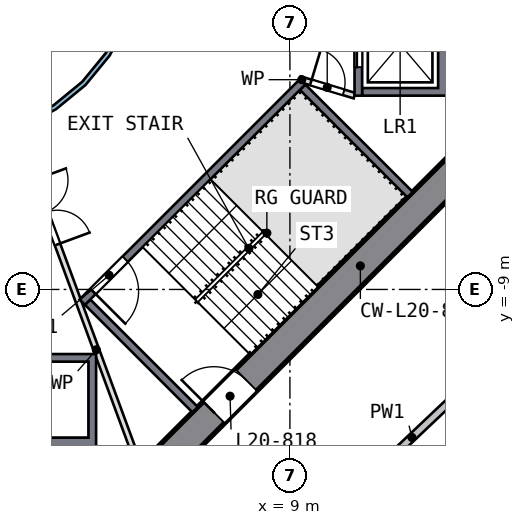
"""IFC4 building model, lengths in metres.
Left out: names, types, materials, properties, quantities, classifications, styles, units other than length and angle.
Written with IfcOpenShell. Run it as: python <this file> out.ifc"""

import sys

from ifc_helpers import new_model, si_unit, direction, frame, frame_2d, origin, place, context, subcontext, project, spatial, polyline, rectangle, outline, extrude, element, fill, save


model = new_model("IFC4")
c1 = context("Model", 3, precision=1e-05, world=origin(), true_north=direction((0.0, 1.0)))
c2 = subcontext(c1, "Body", "Model", "MODEL_VIEW")
j1 = project(units=[si_unit("LENGTHUNIT", "METRE"), si_unit("PLANEANGLEUNIT", "RADIAN")], contexts=[c1])
p1 = place(None, origin())
s1 = spatial("IfcSite", under=j1, at=p1, CompositionType="ELEMENT")
p2 = place(p1, origin())
s2 = spatial("IfcBuilding", under=s1, at=p2, CompositionType="ELEMENT")
p3 = place(p2, frame((0.0, 0.0, 89.5)))
s3 = spatial("IfcBuildingStorey", under=s2, at=p3, CompositionType="ELEMENT", Elevation=89.5)
p4 = place(p3, frame((5.516, -13.717, 0.0), z_axis=(0.0, 0.0, 1.0), x_axis=(0.707106781, 0.707106781, 0.0)))
e1 = element("IfcWall", 1, at=p4, inside=s3, PredefinedType="SHEAR", context=c2, shape_type="SweptSolid", body=[
    extrude(rectangle(XDim=11.598, YDim=0.8, at=frame_2d((5.799, 0.0))), origin(), (0.0, 0.0, 1.0), 3.5),
])
p5 = place(p4, frame((2.099, 0.0, 0.0)))
e2 = element("IfcOpeningElement", 2, at=p5, cuts=e1, PredefinedType="OPENING", context=c2, shape_type="SweptSolid", body=[
    extrude(rectangle(XDim=1.2, YDim=2.1, at=frame_2d((0.6, 1.05))), frame((0.0, 0.41, 0.0), z_axis=(0.0, -1.0, 0.0), x_axis=(1.0, 0.0, 0.0)), (0.0, 0.0, 1.0), 0.82),
])
p6 = place(p3, origin())
e3 = element("IfcWall", 3, at=p6, inside=s3, PredefinedType="SOLIDWALL", context=c2, shape_type="SweptSolid", body=[
    extrude(outline(polyline([(13.2, -3.9), (10.9, -3.9), (10.9, -3.7), (12.9, -3.7), (12.9, -1.4), (10.9, -1.4), (10.9, -1.2), (13.2, -1.2), (13.2, -3.9)])), origin(), (0.0, 0.0, 1.0), 3.19),
])
p7 = place(p3, frame((10.8, -1.2, 0.0), z_axis=(0.0, 0.0, 1.0), x_axis=(0.0, -1.0, 0.0)))
e4 = element("IfcWall", 4, at=p7, inside=s3, PredefinedType="SOLIDWALL", context=c2, shape_type="SweptSolid", body=[
    extrude(rectangle(XDim=2.7, YDim=0.2, at=frame_2d((1.35, 0.0))), origin(), (0.0, 0.0, 1.0), 3.19),
])
p8 = place(p7, frame((0.75, 0.0, 0.0)))
e5 = element("IfcOpeningElement", 5, at=p8, cuts=e4, PredefinedType="OPENING", context=c2, shape_type="SweptSolid", body=[
    extrude(rectangle(XDim=1.2, YDim=2.1, at=frame_2d((0.6, 1.05))), frame((0.0, 0.11, 0.0), z_axis=(0.0, -1.0, 0.0), x_axis=(1.0, 0.0, 0.0)), (0.0, 0.0, 1.0), 0.22),
])
p9 = place(p3, origin())
e6 = element("IfcWall", 6, at=p9, inside=s3, PredefinedType="SOLIDWALL", context=c2, shape_type="SweptSolid", body=[
    extrude(outline(polyline([(3.9, -10.7), (3.9, -13.2), (1.2, -13.2), (1.2, -10.7), (3.9, -10.7)]), holes=[polyline([(1.4, -12.9), (3.7, -12.9), (3.7, -10.9), (1.4, -10.9), (1.4, -12.9)])]), origin(), (0.0, 0.0, 1.0), 3.19),
])
p10 = place(p3, frame((9.334, -3.535, 0.0), z_axis=(0.0, 0.0, 1.0), x_axis=(-0.707106781, -0.707106781, 0.0)))
e7 = element("IfcWall", 7, at=p10, inside=s3, PredefinedType="SOLIDWALL", context=c2, shape_type="SweptSolid", body=[
    extrude(rectangle(XDim=8.2, YDim=0.2, at=frame_2d((4.1, 0.0))), origin(), (0.0, 0.0, 1.0), 3.19),
])
p11 = place(p10, frame((6.6, 0.0, 0.0)))
e8 = element("IfcOpeningElement", 8, at=p11, cuts=e7, PredefinedType="OPENING", context=c2, shape_type="SweptSolid", body=[
    extrude(rectangle(XDim=1.2, YDim=2.1, at=frame_2d((0.6, 1.05))), frame((0.0, 0.11, 0.0), z_axis=(0.0, -1.0, 0.0), x_axis=(1.0, 0.0, 0.0)), (0.0, 0.0, 1.0), 0.22),
])
for number, where, z_axis, x_axis in (
    (9, (3.677, -9.334, 0.0), (0.0, 0.0, 1.0), (0.707, -0.707, 0.0)),
    (10, (9.334, -3.677, 0.0), (0.0, 0.0, 1.0), (0.707, -0.707, 0.0)),
):
    element("IfcWall", number, at=place(p3, frame(where, z_axis=z_axis, x_axis=x_axis)), inside=s3, PredefinedType="SOLIDWALL", context=c2, shape_type="SweptSolid", body=[
        extrude(rectangle(XDim=4.0, YDim=0.2, at=frame_2d((2.0, 0.0))), origin(), (0.0, 0.0, 1.0), 3.19),
    ])
p12 = place(p3, frame((9.263, -3.465, 0.0), z_axis=(0.0, 0.0, 1.0), x_axis=(0.957084567, -0.289808785, 0.0)))
e11 = element("IfcWall", 11, at=p12, inside=s3, PredefinedType="PARTITIONING", context=c2, shape_type="SweptSolid", body=[
    extrude(rectangle(XDim=1.501, YDim=0.15, at=frame_2d((0.75, 0.0))), origin(), (0.0, 0.0, 1.0), 3.19),
])
p13 = place(p12, frame((0.301, 0.0, 0.0)))
e12 = element("IfcOpeningElement", 12, at=p13, cuts=e11, PredefinedType="OPENING", context=c2, shape_type="SweptSolid", body=[
    extrude(rectangle(XDim=0.9, YDim=2.1, at=frame_2d((0.45, 1.05))), frame((0.0, 0.085, 0.0), z_axis=(0.0, -1.0, 0.0), x_axis=(1.0, 0.0, 0.0)), (0.0, 0.0, 1.0), 0.17),
])
p14 = place(p3, frame((1.776, -4.813, 0.0), z_axis=(0.0, 0.0, 1.0), x_axis=(0.346115488, -0.938191915, 0.0)))
e13 = element("IfcWall", 13, at=p14, inside=s3, PredefinedType="PARTITIONING", context=c2, shape_type="SweptSolid", body=[
    extrude(rectangle(XDim=8.91, YDim=0.15, at=frame_2d((4.455, 0.0))), origin(), (0.0, 0.0, 1.0), 3.19),
])
p15 = place(p14, frame((1.4, 0.0, 0.0)))
e14 = element("IfcOpeningElement", 14, at=p15, cuts=e13, PredefinedType="OPENING", context=c2, shape_type="SweptSolid", body=[
    extrude(rectangle(XDim=1.8, YDim=2.1, at=frame_2d((0.9, 1.05))), frame((0.0, 0.085, 0.0), z_axis=(0.0, -1.0, 0.0), x_axis=(1.0, 0.0, 0.0)), (0.0, 0.0, 1.0), 0.17),
])
p16 = place(p3, origin())
e15 = element("IfcWall", 15, at=p16, inside=s3, PredefinedType="SOLIDWALL", context=c2, shape_type="SweptSolid", body=[
    extrude(outline(polyline([(5.021, -0.999), (4.73, -1.959), (4.257, -2.844), (3.62, -3.62), (2.844, -4.257), (1.959, -4.73), (0.999, -5.021), (0.0, -5.12), (-0.999, -5.021), (-1.959, -4.73), (-2.844, -4.257), (-3.62, -3.62), (-4.257, -2.844), (-4.73, -1.959), (-5.021, -0.999), (-5.12, 0.0), (-5.021, 0.999), (-4.73, 1.959), (-4.257, 2.844), (-3.62, 3.62), (-2.844, 4.257), (-1.959, 4.73), (-0.999, 5.021), (0.0, 5.12), (0.999, 5.021), (1.959, 4.73), (2.844, 4.257), (3.62, 3.62), (4.257, 2.844), (4.73, 1.959), (5.021, 0.999), (5.12, 0.0), (5.021, -0.999)]), holes=[polyline([(4.904, 0.976), (4.619, 1.913), (4.157, 2.778), (3.535, 3.535), (2.778, 4.157), (1.913, 4.619), (0.976, 4.904), (0.0, 5.0), (-0.976, 4.904), (-1.913, 4.619), (-2.778, 4.157), (-3.535, 3.535), (-4.157, 2.778), (-4.619, 1.913), (-4.904, 0.976), (-5.0, 0.0), (-4.904, -0.976), (-4.619, -1.913), (-4.157, -2.778), (-3.535, -3.535), (-2.778, -4.157), (-1.913, -4.619), (-0.976, -4.904), (0.0, -5.0), (0.976, -4.904), (1.913, -4.619), (2.778, -4.157), (3.535, -3.535), (4.157, -2.778), (4.619, -1.913), (4.904, -0.976), (5.0, 0.0), (4.904, 0.976)])]), origin(), (0.0, 0.0, 1.0), 3.19),
])
p17 = place(p3, frame((8.756, -16.166, 0.0), z_axis=(0.0, 0.0, 1.0), x_axis=(0.726098959, 0.687590213, 0.0)))
e16 = element("IfcWall", 16, at=p17, inside=s3, PredefinedType="SOLIDWALL", context=c2, shape_type="SweptSolid", body=[
    extrude(rectangle(XDim=9.516, YDim=0.2, at=frame_2d((4.758, 0.0))), origin(), (0.0, 0.0, 1.0), 3.19),
])
p18 = place(p8, origin())
e17 = element("IfcDoor", 17, at=p18, inside=s3, OperationType="DOUBLE_DOOR_SLIDING", PredefinedType="DOOR", context=c2, shape_type="SweptSolid", body=[
    extrude(rectangle(XDim=1.2, YDim=2.1, at=frame_2d((0.6, 1.05))), frame((0.0, 0.025, 0.0), z_axis=(0.0, -1.0, 0.0), x_axis=(1.0, 0.0, 0.0)), (0.0, 0.0, 1.0), 0.05),
])
fill(e5, e17)
p19 = place(p11, origin())
e18 = element("IfcDoor", 18, at=p19, inside=s3, OperationType="SINGLE_SWING_RIGHT", PredefinedType="DOOR", context=c2, shape_type="SweptSolid", body=[
    extrude(rectangle(XDim=1.2, YDim=2.1, at=frame_2d((0.6, 1.05))), frame((0.0, 0.025, 0.0), z_axis=(0.0, -1.0, 0.0), x_axis=(1.0, 0.0, 0.0)), (0.0, 0.0, 1.0), 0.05),
])
fill(e8, e18)
p20 = place(p5, origin())
e19 = element("IfcDoor", 19, at=p20, inside=s3, OperationType="SINGLE_SWING_LEFT", PredefinedType="DOOR", context=c2, shape_type="SweptSolid", body=[
    extrude(rectangle(XDim=1.2, YDim=2.1, at=frame_2d((0.6, 1.05))), frame((0.0, 0.025, 0.0), z_axis=(0.0, -1.0, 0.0), x_axis=(1.0, 0.0, 0.0)), (0.0, 0.0, 1.0), 0.05),
])
fill(e2, e19)
p21 = place(p13, origin())
e20 = element("IfcDoor", 20, at=p21, inside=s3, OperationType="SINGLE_SWING_LEFT", PredefinedType="DOOR", context=c2, shape_type="SweptSolid", body=[
    extrude(rectangle(XDim=0.9, YDim=2.1, at=frame_2d((0.45, 1.05))), frame((0.0, 0.025, 0.0), z_axis=(0.0, -1.0, 0.0), x_axis=(1.0, 0.0, 0.0)), (0.0, 0.0, 1.0), 0.05),
])
fill(e12, e20)
p22 = place(p15, origin())
e21 = element("IfcDoor", 21, at=p22, inside=s3, OperationType="DOUBLE_DOOR_SINGLE_SWING", PredefinedType="DOOR", context=c2, shape_type="SweptSolid", body=[
    extrude(rectangle(XDim=1.8, YDim=2.1, at=frame_2d((0.9, 1.05))), frame((0.0, 0.025, 0.0), z_axis=(0.0, -1.0, 0.0), x_axis=(1.0, 0.0, 0.0)), (0.0, 0.0, 1.0), 0.05),
])
fill(e14, e21)
save(model, sys.argv[1])
